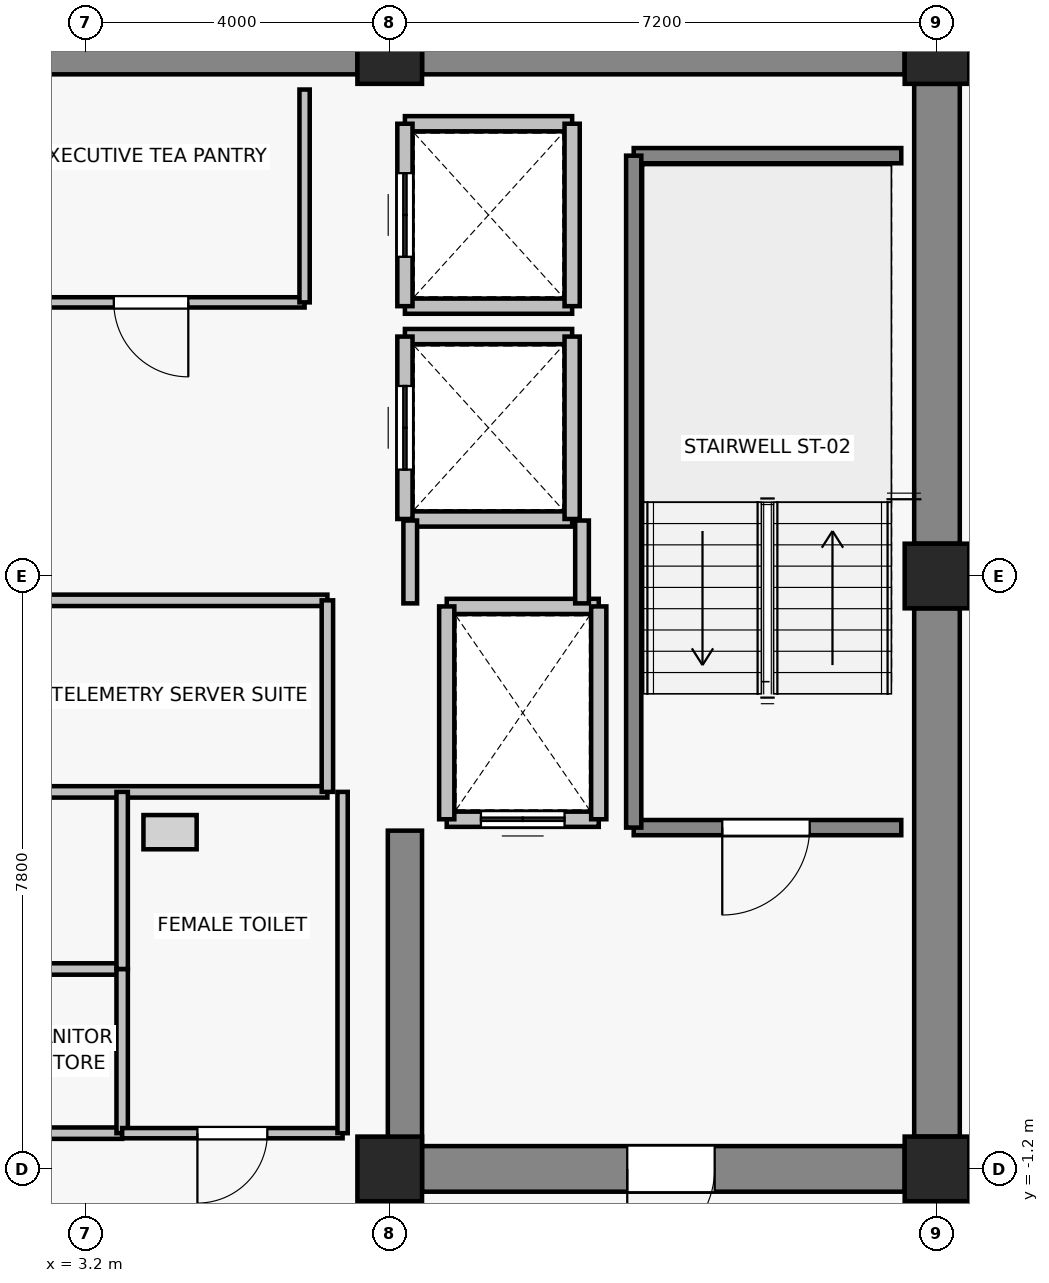
"""IFC4 building model, lengths in metres.
Left out: names, types, materials, properties, quantities, classifications, styles, units other than length and angle.
Written with IfcOpenShell. Run it as: python <this file> out.ifc"""

import sys

from ifc_helpers import new_model, si_unit, direction, frame, frame_2d, origin, origin_2d, place, context, subcontext, project, spatial, rectangle, extrude, source, transform, mapped, element, fill, save


model = new_model("IFC4")
c1 = context("Model", 3, precision=1e-05, world=origin(), true_north=direction((0.0, 1.0)))
c2 = subcontext(c1, "Body", "Model", "MODEL_VIEW")
j1 = project(units=[si_unit("LENGTHUNIT", "METRE"), si_unit("PLANEANGLEUNIT", "RADIAN")], contexts=[c1])
p1 = place(None, origin())
s1 = spatial("IfcSite", under=j1, at=p1, CompositionType="ELEMENT")
p2 = place(p1, origin())
s2 = spatial("IfcBuilding", under=s1, at=p2, CompositionType="ELEMENT")
p3 = place(p2, frame((0.0, 0.0, 258.4)))
s3 = spatial("IfcBuildingStorey", under=s2, at=p3, CompositionType="ELEMENT", Elevation=258.4)
for number, where, z_axis, x_axis in (
    (1, (7.2, -1.2, 0.0), (0.0, 0.0, 1.0), (1.0, 0.0, 0.0)),
    (2, (14.4, -1.2, 0.0), (0.0, 0.0, 1.0), (1.0, 0.0, 0.0)),
    (3, (14.4, 6.6, 0.0), (0.0, 0.0, 1.0), (1.0, 0.0, 0.0)),
    (4, (7.2, 13.5, 0.0), (0.0, 0.0, 1.0), (1.0, 0.0, 0.0)),
    (5, (14.4, 13.5, 0.0), (0.0, 0.0, 1.0), (1.0, 0.0, 0.0)),
):
    element("IfcColumn", number, at=place(p3, frame(where, z_axis=z_axis, x_axis=x_axis)), inside=s3, PredefinedType="COLUMN", context=c2, shape_type="SweptSolid", body=[
        extrude(rectangle(XDim=0.85, YDim=0.85, at=origin_2d()), origin(), (0.0, 0.0, 1.0), 3.3),
    ])
p4 = place(p3, frame((-6.775, 13.5, 0.0), z_axis=(0.0, 0.0, 1.0), x_axis=(1.0, 0.0, 0.0)))
e6 = element("IfcWall", 6, at=p4, inside=s3, PredefinedType="SHEAR", context=c2, shape_type="SweptSolid", body=[
    extrude(rectangle(XDim=13.55, YDim=0.6, at=frame_2d((6.775, 0.0))), origin(), (0.0, 0.0, 1.0), 3.075),
])
p5 = place(p3, frame((7.625, 13.5, 0.0), z_axis=(0.0, 0.0, 1.0), x_axis=(1.0, 0.0, 0.0)))
e7 = element("IfcWall", 7, at=p5, inside=s3, PredefinedType="SHEAR", context=c2, shape_type="SweptSolid", body=[
    extrude(rectangle(XDim=6.35, YDim=0.6, at=frame_2d((3.175, 0.0))), origin(), (0.0, 0.0, 1.0), 3.075),
])
p6 = place(p3, frame((14.4, -0.775, 0.0), z_axis=(0.0, 0.0, 1.0), x_axis=(0.0, 1.0, 0.0)))
e8 = element("IfcWall", 8, at=p6, inside=s3, PredefinedType="SHEAR", context=c2, shape_type="SweptSolid", body=[
    extrude(rectangle(XDim=6.95, YDim=0.6, at=frame_2d((3.475, 0.0))), origin(), (0.0, 0.0, 1.0), 3.075),
])
p7 = place(p3, frame((14.4, 7.025, 0.0), z_axis=(0.0, 0.0, 1.0), x_axis=(0.0, 1.0, 0.0)))
e9 = element("IfcWall", 9, at=p7, inside=s3, PredefinedType="SHEAR", context=c2, shape_type="SweptSolid", body=[
    extrude(rectangle(XDim=6.05, YDim=0.6, at=frame_2d((3.025, 0.0))), origin(), (0.0, 0.0, 1.0), 3.075),
])
p8 = place(p3, frame((13.975, -1.2, 0.0), z_axis=(0.0, 0.0, 1.0), x_axis=(-1.0, 0.0, 0.0)))
e10 = element("IfcWall", 10, at=p8, inside=s3, PredefinedType="SHEAR", context=c2, shape_type="SweptSolid", body=[
    extrude(rectangle(XDim=6.35, YDim=0.6, at=frame_2d((3.175, 0.0))), origin(), (0.0, 0.0, 1.0), 3.075),
])
p9 = place(p8, frame((2.5, 0.0, 0.0)))
e11 = element("IfcOpeningElement", 11, at=p9, cuts=e10, PredefinedType="OPENING", context=c2, shape_type="SweptSolid", body=[
    extrude(rectangle(XDim=1.15, YDim=2.15, at=frame_2d((0.575, 1.075))), frame((0.0, 0.31, 0.0), z_axis=(0.0, -1.0, 0.0), x_axis=(1.0, 0.0, 0.0)), (0.0, 0.0, 1.0), 0.62),
])
p10 = place(p3, frame((7.4, -0.9, 0.0), z_axis=(0.0, 0.0, 1.0), x_axis=(0.0, 1.0, 0.0)))
e12 = element("IfcWall", 12, at=p10, inside=s3, PredefinedType="SHEAR", context=c2, shape_type="SweptSolid", body=[
    extrude(rectangle(XDim=4.15, YDim=0.45, at=frame_2d((2.075, 0.0))), origin(), (0.0, 0.0, 1.0), 3.075),
])
p11 = place(p3, frame((9.95, 3.4, 0.0), z_axis=(0.0, 0.0, 1.0), x_axis=(-1.0, 0.0, 0.0)))
e13 = element("IfcWall", 13, at=p11, inside=s3, PredefinedType="SOLIDWALL", context=c2, shape_type="SweptSolid", body=[
    extrude(rectangle(XDim=2.0, YDim=0.2, at=frame_2d((1.0, 0.0))), origin(), (0.0, 0.0, 1.0), 3.075),
])
p12 = place(p11, frame((0.45, 0.0, 0.0)))
e14 = element("IfcOpeningElement", 14, at=p12, cuts=e13, PredefinedType="OPENING", context=c2, shape_type="SweptSolid", body=[
    extrude(rectangle(XDim=1.1, YDim=2.2, at=frame_2d((0.55, 1.1))), frame((0.0, 0.11, 0.0), z_axis=(0.0, -1.0, 0.0), x_axis=(1.0, 0.0, 0.0)), (0.0, 0.0, 1.0), 0.22),
])
p13 = place(p3, frame((7.95, 6.2, 0.0), z_axis=(0.0, 0.0, 1.0), x_axis=(1.0, 0.0, 0.0)))
e15 = element("IfcWall", 15, at=p13, inside=s3, PredefinedType="SOLIDWALL", context=c2, shape_type="SweptSolid", body=[
    extrude(rectangle(XDim=2.0, YDim=0.2, at=frame_2d((1.0, 0.0))), origin(), (0.0, 0.0, 1.0), 3.075),
])
for number, where, z_axis, x_axis in (
    (16, (7.95, 3.4, 0.0), (0.0, 0.0, 1.0), (0.0, 1.0, 0.0)),
    (17, (9.95, 6.2, 0.0), (0.0, 0.0, 1.0), (0.0, -1.0, 0.0)),
):
    element("IfcWall", number, at=place(p3, frame(where, z_axis=z_axis, x_axis=x_axis)), inside=s3, PredefinedType="SOLIDWALL", context=c2, shape_type="SweptSolid", body=[
        extrude(rectangle(XDim=2.8, YDim=0.2, at=frame_2d((1.4, 0.0))), origin(), (0.0, 0.0, 1.0), 3.075),
    ])
for number, where, z_axis, x_axis in (
    (18, (9.6, 7.35, 0.0), (0.0, 0.0, 1.0), (-1.0, 0.0, 0.0)),
    (19, (7.4, 9.75, 0.0), (0.0, 0.0, 1.0), (1.0, 0.0, 0.0)),
):
    element("IfcWall", number, at=place(p3, frame(where, z_axis=z_axis, x_axis=x_axis)), inside=s3, PredefinedType="SOLIDWALL", context=c2, shape_type="SweptSolid", body=[
        extrude(rectangle(XDim=2.2, YDim=0.2, at=frame_2d((1.1, 0.0))), origin(), (0.0, 0.0, 1.0), 2.615),
    ])
p14 = place(p3, frame((7.4, 7.35, 0.0), z_axis=(0.0, 0.0, 1.0), x_axis=(0.0, 1.0, 0.0)))
e20 = element("IfcWall", 20, at=p14, inside=s3, PredefinedType="SOLIDWALL", context=c2, shape_type="SweptSolid", body=[
    extrude(rectangle(XDim=2.4, YDim=0.2, at=frame_2d((1.2, 0.0))), origin(), (0.0, 0.0, 1.0), 2.615),
])
p15 = place(p14, frame((0.65, 0.0, 0.0)))
e21 = element("IfcOpeningElement", 21, at=p15, cuts=e20, PredefinedType="OPENING", context=c2, shape_type="SweptSolid", body=[
    extrude(rectangle(XDim=1.1, YDim=2.2, at=frame_2d((0.55, 1.1))), frame((0.0, 0.11, 0.0), z_axis=(0.0, -1.0, 0.0), x_axis=(1.0, 0.0, 0.0)), (0.0, 0.0, 1.0), 0.22),
])
p16 = place(p3, frame((9.6, 9.75, 0.0), z_axis=(0.0, 0.0, 1.0), x_axis=(0.0, -1.0, 0.0)))
e22 = element("IfcWall", 22, at=p16, inside=s3, PredefinedType="SOLIDWALL", context=c2, shape_type="SweptSolid", body=[
    extrude(rectangle(XDim=2.4, YDim=0.2, at=frame_2d((1.2, 0.0))), origin(), (0.0, 0.0, 1.0), 3.075),
])
for number, where, z_axis, x_axis in (
    (23, (9.6, 10.15, 0.0), (0.0, 0.0, 1.0), (-1.0, 0.0, 0.0)),
    (24, (7.4, 12.55, 0.0), (0.0, 0.0, 1.0), (1.0, 0.0, 0.0)),
):
    element("IfcWall", number, at=place(p3, frame(where, z_axis=z_axis, x_axis=x_axis)), inside=s3, PredefinedType="SOLIDWALL", context=c2, shape_type="SweptSolid", body=[
        extrude(rectangle(XDim=2.2, YDim=0.2, at=frame_2d((1.1, 0.0))), origin(), (0.0, 0.0, 1.0), 2.615),
    ])
p17 = place(p3, frame((7.4, 10.15, 0.0), z_axis=(0.0, 0.0, 1.0), x_axis=(0.0, 1.0, 0.0)))
e25 = element("IfcWall", 25, at=p17, inside=s3, PredefinedType="SOLIDWALL", context=c2, shape_type="SweptSolid", body=[
    extrude(rectangle(XDim=2.4, YDim=0.2, at=frame_2d((1.2, 0.0))), origin(), (0.0, 0.0, 1.0), 2.615),
])
p18 = place(p17, frame((0.65, 0.0, 0.0)))
e26 = element("IfcOpeningElement", 26, at=p18, cuts=e25, PredefinedType="OPENING", context=c2, shape_type="SweptSolid", body=[
    extrude(rectangle(XDim=1.1, YDim=2.2, at=frame_2d((0.55, 1.1))), frame((0.0, 0.11, 0.0), z_axis=(0.0, -1.0, 0.0), x_axis=(1.0, 0.0, 0.0)), (0.0, 0.0, 1.0), 0.22),
])
p19 = place(p3, frame((9.6, 12.55, 0.0), z_axis=(0.0, 0.0, 1.0), x_axis=(0.0, -1.0, 0.0)))
e27 = element("IfcWall", 27, at=p19, inside=s3, PredefinedType="SOLIDWALL", context=c2, shape_type="SweptSolid", body=[
    extrude(rectangle(XDim=2.4, YDim=0.2, at=frame_2d((1.2, 0.0))), origin(), (0.0, 0.0, 1.0), 3.075),
])
p20 = place(p3, frame((13.93, 3.29, 0.0), z_axis=(0.0, 0.0, 1.0), x_axis=(-1.0, 0.0, 0.0)))
e28 = element("IfcWall", 28, at=p20, inside=s3, PredefinedType="SOLIDWALL", context=c2, shape_type="SweptSolid", body=[
    extrude(rectangle(XDim=3.52, YDim=0.2, at=frame_2d((1.76, 0.0))), origin(), (0.0, 0.0, 1.0), 3.075),
])
p21 = place(p20, frame((1.205, 0.0, 0.0)))
e29 = element("IfcOpeningElement", 29, at=p21, cuts=e28, PredefinedType="OPENING", context=c2, shape_type="SweptSolid", body=[
    extrude(rectangle(XDim=1.15, YDim=2.15, at=frame_2d((0.575, 1.075))), frame((0.0, 0.11, 0.0), z_axis=(0.0, -1.0, 0.0), x_axis=(1.0, 0.0, 0.0)), (0.0, 0.0, 1.0), 0.22),
])
p22 = place(p3, frame((10.41, 12.13, 0.0), z_axis=(0.0, 0.0, 1.0), x_axis=(1.0, 0.0, 0.0)))
e30 = element("IfcWall", 30, at=p22, inside=s3, PredefinedType="SOLIDWALL", context=c2, shape_type="SweptSolid", body=[
    extrude(rectangle(XDim=3.52, YDim=0.2, at=frame_2d((1.76, 0.0))), origin(), (0.0, 0.0, 1.0), 3.075),
])
p23 = place(p3, frame((10.41, 3.29, 0.0), z_axis=(0.0, 0.0, 1.0), x_axis=(0.0, 1.0, 0.0)))
e31 = element("IfcWall", 31, at=p23, inside=s3, PredefinedType="SOLIDWALL", context=c2, shape_type="SweptSolid", body=[
    extrude(rectangle(XDim=8.84, YDim=0.2, at=frame_2d((4.42, 0.0))), origin(), (0.0, 0.0, 1.0), 3.075),
])
p24 = place(p3, frame((7.47, 6.24, 0.0), z_axis=(0.0, 0.0, 1.0), x_axis=(0.0, 1.0, 0.0)))
e32 = element("IfcWall", 32, at=p24, inside=s3, PredefinedType="PARTITIONING", context=c2, shape_type="SweptSolid", body=[
    extrude(rectangle(XDim=1.09, YDim=0.18, at=frame_2d((0.545, 0.0))), origin(), (0.0, 0.0, 1.0), 2.615),
])
p25 = place(p3, frame((9.73, 7.33, 0.0), z_axis=(0.0, 0.0, 1.0), x_axis=(0.0, -1.0, 0.0)))
e33 = element("IfcWall", 33, at=p25, inside=s3, PredefinedType="PARTITIONING", context=c2, shape_type="SweptSolid", body=[
    extrude(rectangle(XDim=1.09, YDim=0.18, at=frame_2d((0.545, 0.0))), origin(), (0.0, 0.0, 1.0), 3.075),
])
p26 = place(p3, frame((6.08, 10.2, 0.0), z_axis=(0.0, 0.0, 1.0), x_axis=(-1.0, 0.0, 0.0)))
e34 = element("IfcWall", 34, at=p26, inside=s3, PredefinedType="PARTITIONING", context=c2, shape_type="SweptSolid", body=[
    extrude(rectangle(XDim=4.04, YDim=0.135, at=frame_2d((2.02, 0.0))), origin(), (0.0, 0.0, 1.0), 3.075),
])
p27 = place(p26, frame((1.53, 0.0, 0.0)))
e35 = element("IfcOpeningElement", 35, at=p27, cuts=e34, PredefinedType="OPENING", context=c2, shape_type="SweptSolid", body=[
    extrude(rectangle(XDim=0.98, YDim=2.15, at=frame_2d((0.49, 1.075))), frame((0.0, 0.077, 0.0), z_axis=(0.0, -1.0, 0.0), x_axis=(1.0, 0.0, 0.0)), (0.0, 0.0, 1.0), 0.155),
])
p28 = place(p3, frame((6.08, 13.0, 0.0), z_axis=(0.0, 0.0, 1.0), x_axis=(0.0, -1.0, 0.0)))
e36 = element("IfcWall", 36, at=p28, inside=s3, PredefinedType="PARTITIONING", context=c2, shape_type="SweptSolid", body=[
    extrude(rectangle(XDim=2.8, YDim=0.135, at=frame_2d((1.4, 0.0))), origin(), (0.0, 0.0, 1.0), 3.075),
])
for number, where, z_axis, x_axis in (
    (37, (6.38, 3.76, 0.0), (0.0, 0.0, 1.0), (-1.0, 0.0, 0.0)),
    (38, (1.47, 6.28, 0.0), (0.0, 0.0, 1.0), (1.0, 0.0, 0.0)),
):
    element("IfcWall", number, at=place(p3, frame(where, z_axis=z_axis, x_axis=x_axis)), inside=s3, PredefinedType="PARTITIONING", context=c2, shape_type="SweptSolid", body=[
        extrude(rectangle(XDim=4.91, YDim=0.15, at=frame_2d((2.455, 0.0))), origin(), (0.0, 0.0, 1.0), 3.075),
    ])
p29 = place(p3, frame((6.38, 6.28, 0.0), z_axis=(0.0, 0.0, 1.0), x_axis=(0.0, -1.0, 0.0)))
e39 = element("IfcWall", 39, at=p29, inside=s3, PredefinedType="PARTITIONING", context=c2, shape_type="SweptSolid", body=[
    extrude(rectangle(XDim=2.52, YDim=0.15, at=frame_2d((1.26, 0.0))), origin(), (0.0, 0.0, 1.0), 3.075),
])
for number, where, z_axis, x_axis in (
    (40, (3.68, -0.73, 0.0), (0.0, 0.0, 1.0), (-1.0, 0.0, 0.0)),
    (41, (1.47, 1.43, 0.0), (0.0, 0.0, 1.0), (1.0, 0.0, 0.0)),
):
    element("IfcWall", number, at=place(p3, frame(where, z_axis=z_axis, x_axis=x_axis)), inside=s3, PredefinedType="PARTITIONING", context=c2, shape_type="SweptSolid", body=[
        extrude(rectangle(XDim=2.21, YDim=0.15, at=frame_2d((1.105, 0.0))), origin(), (0.0, 0.0, 1.0), 3.075),
    ])
p30 = place(p3, frame((3.68, 1.43, 0.0), z_axis=(0.0, 0.0, 1.0), x_axis=(0.0, -1.0, 0.0)))
e42 = element("IfcWall", 42, at=p30, inside=s3, PredefinedType="PARTITIONING", context=c2, shape_type="SweptSolid", body=[
    extrude(rectangle(XDim=2.16, YDim=0.15, at=frame_2d((1.08, 0.0))), origin(), (0.0, 0.0, 1.0), 3.075),
])
p31 = place(p3, frame((3.68, 3.76, 0.0), z_axis=(0.0, 0.0, 1.0), x_axis=(0.0, -1.0, 0.0)))
e43 = element("IfcWall", 43, at=p31, inside=s3, PredefinedType="PARTITIONING", context=c2, shape_type="SweptSolid", body=[
    extrude(rectangle(XDim=2.33, YDim=0.15, at=frame_2d((1.165, 0.0))), origin(), (0.0, 0.0, 1.0), 3.075),
])
p32 = place(p3, frame((6.58, -0.73, 0.0), z_axis=(0.0, 0.0, 1.0), x_axis=(-1.0, 0.0, 0.0)))
e44 = element("IfcWall", 44, at=p32, inside=s3, PredefinedType="PARTITIONING", context=c2, shape_type="SweptSolid", body=[
    extrude(rectangle(XDim=2.9, YDim=0.135, at=frame_2d((1.45, 0.0))), origin(), (0.0, 0.0, 1.0), 3.075),
])
p33 = place(p32, frame((0.99, 0.0, 0.0)))
e45 = element("IfcOpeningElement", 45, at=p33, cuts=e44, PredefinedType="OPENING", context=c2, shape_type="SweptSolid", body=[
    extrude(rectangle(XDim=0.92, YDim=2.1, at=frame_2d((0.46, 1.05))), frame((0.0, 0.077, 0.0), z_axis=(0.0, -1.0, 0.0), x_axis=(1.0, 0.0, 0.0)), (0.0, 0.0, 1.0), 0.155),
])
p34 = place(p3, frame((6.58, 3.76, 0.0), z_axis=(0.0, 0.0, 1.0), x_axis=(0.0, -1.0, 0.0)))
e46 = element("IfcWall", 46, at=p34, inside=s3, PredefinedType="PARTITIONING", context=c2, shape_type="SweptSolid", body=[
    extrude(rectangle(XDim=4.49, YDim=0.135, at=frame_2d((2.245, 0.0))), origin(), (0.0, 0.0, 1.0), 3.075),
])
m1 = source(origin(), c2, "Body", "SweptSolid", [
    extrude(rectangle(XDim=1.1, YDim=2.2, at=frame_2d((0.55, 1.1))), frame((0.0, 0.025, 0.0), z_axis=(0.0, -1.0, 0.0), x_axis=(1.0, 0.0, 0.0)), (0.0, 0.0, 1.0), 0.05),
])
p35 = place(p12, origin())
e47 = element("IfcDoor", 47, at=p35, inside=s3, OperationType="DOUBLE_DOOR_SLIDING", PredefinedType="DOOR", context=c2, shape_type="MappedRepresentation", body=[
    mapped(m1, transform((0.0, 0.0, 0.0), x_axis=(1.0, 0.0, 0.0), y_axis=(0.0, 1.0, 0.0), z_axis=(0.0, 0.0, 1.0), scale=1.0)),
])
fill(e14, e47)
p36 = place(p15, origin())
e48 = element("IfcDoor", 48, at=p36, inside=s3, OperationType="DOUBLE_DOOR_SLIDING", PredefinedType="DOOR", context=c2, shape_type="MappedRepresentation", body=[
    mapped(m1, transform((0.0, 0.0, 0.0), x_axis=(1.0, 0.0, 0.0), y_axis=(0.0, 1.0, 0.0), z_axis=(0.0, 0.0, 1.0), scale=1.0)),
])
fill(e21, e48)
p37 = place(p18, origin())
e49 = element("IfcDoor", 49, at=p37, inside=s3, OperationType="DOUBLE_DOOR_SLIDING", PredefinedType="DOOR", context=c2, shape_type="MappedRepresentation", body=[
    mapped(m1, transform((0.0, 0.0, 0.0), x_axis=(1.0, 0.0, 0.0), y_axis=(0.0, 1.0, 0.0), z_axis=(0.0, 0.0, 1.0), scale=1.0)),
])
fill(e26, e49)
m2 = source(origin(), c2, "Body", "SweptSolid", [
    extrude(rectangle(XDim=1.15, YDim=2.15, at=frame_2d((0.575, 1.075))), frame((0.0, 0.025, 0.0), z_axis=(0.0, -1.0, 0.0), x_axis=(1.0, 0.0, 0.0)), (0.0, 0.0, 1.0), 0.05),
])
p38 = place(p21, origin())
e50 = element("IfcDoor", 50, at=p38, inside=s3, OperationType="SINGLE_SWING_RIGHT", PredefinedType="DOOR", context=c2, shape_type="MappedRepresentation", body=[
    mapped(m2, transform((0.0, 0.0, 0.0), x_axis=(1.0, 0.0, 0.0), y_axis=(0.0, 1.0, 0.0), z_axis=(0.0, 0.0, 1.0), scale=1.0)),
])
fill(e29, e50)
p39 = place(p9, origin())
e51 = element("IfcDoor", 51, at=p39, inside=s3, OperationType="SINGLE_SWING_RIGHT", PredefinedType="DOOR", context=c2, shape_type="MappedRepresentation", body=[
    mapped(m2, transform((0.0, 0.0, 0.0), x_axis=(1.0, 0.0, 0.0), y_axis=(0.0, 1.0, 0.0), z_axis=(0.0, 0.0, 1.0), scale=1.0)),
])
fill(e11, e51)
m3 = source(origin(), c2, "Body", "SweptSolid", [
    extrude(rectangle(XDim=0.98, YDim=2.15, at=frame_2d((0.49, 1.075))), frame((0.0, 0.025, 0.0), z_axis=(0.0, -1.0, 0.0), x_axis=(1.0, 0.0, 0.0)), (0.0, 0.0, 1.0), 0.05),
])
p40 = place(p27, origin())
e52 = element("IfcDoor", 52, at=p40, inside=s3, OperationType="SINGLE_SWING_LEFT", PredefinedType="DOOR", context=c2, shape_type="MappedRepresentation", body=[
    mapped(m3, transform((0.0, 0.0, 0.0), x_axis=(1.0, 0.0, 0.0), y_axis=(0.0, 1.0, 0.0), z_axis=(0.0, 0.0, 1.0), scale=1.0)),
])
fill(e35, e52)
m4 = source(origin(), c2, "Body", "SweptSolid", [
    extrude(rectangle(XDim=0.92, YDim=2.1, at=frame_2d((0.46, 1.05))), frame((0.0, 0.025, 0.0), z_axis=(0.0, -1.0, 0.0), x_axis=(1.0, 0.0, 0.0)), (0.0, 0.0, 1.0), 0.05),
])
p41 = place(p33, origin())
e53 = element("IfcDoor", 53, at=p41, inside=s3, OperationType="SINGLE_SWING_RIGHT", PredefinedType="DOOR", context=c2, shape_type="MappedRepresentation", body=[
    mapped(m4, transform((0.0, 0.0, 0.0), x_axis=(1.0, 0.0, 0.0), y_axis=(0.0, 1.0, 0.0), z_axis=(0.0, 0.0, 1.0), scale=1.0)),
])
fill(e45, e53)
save(model, sys.argv[1])
